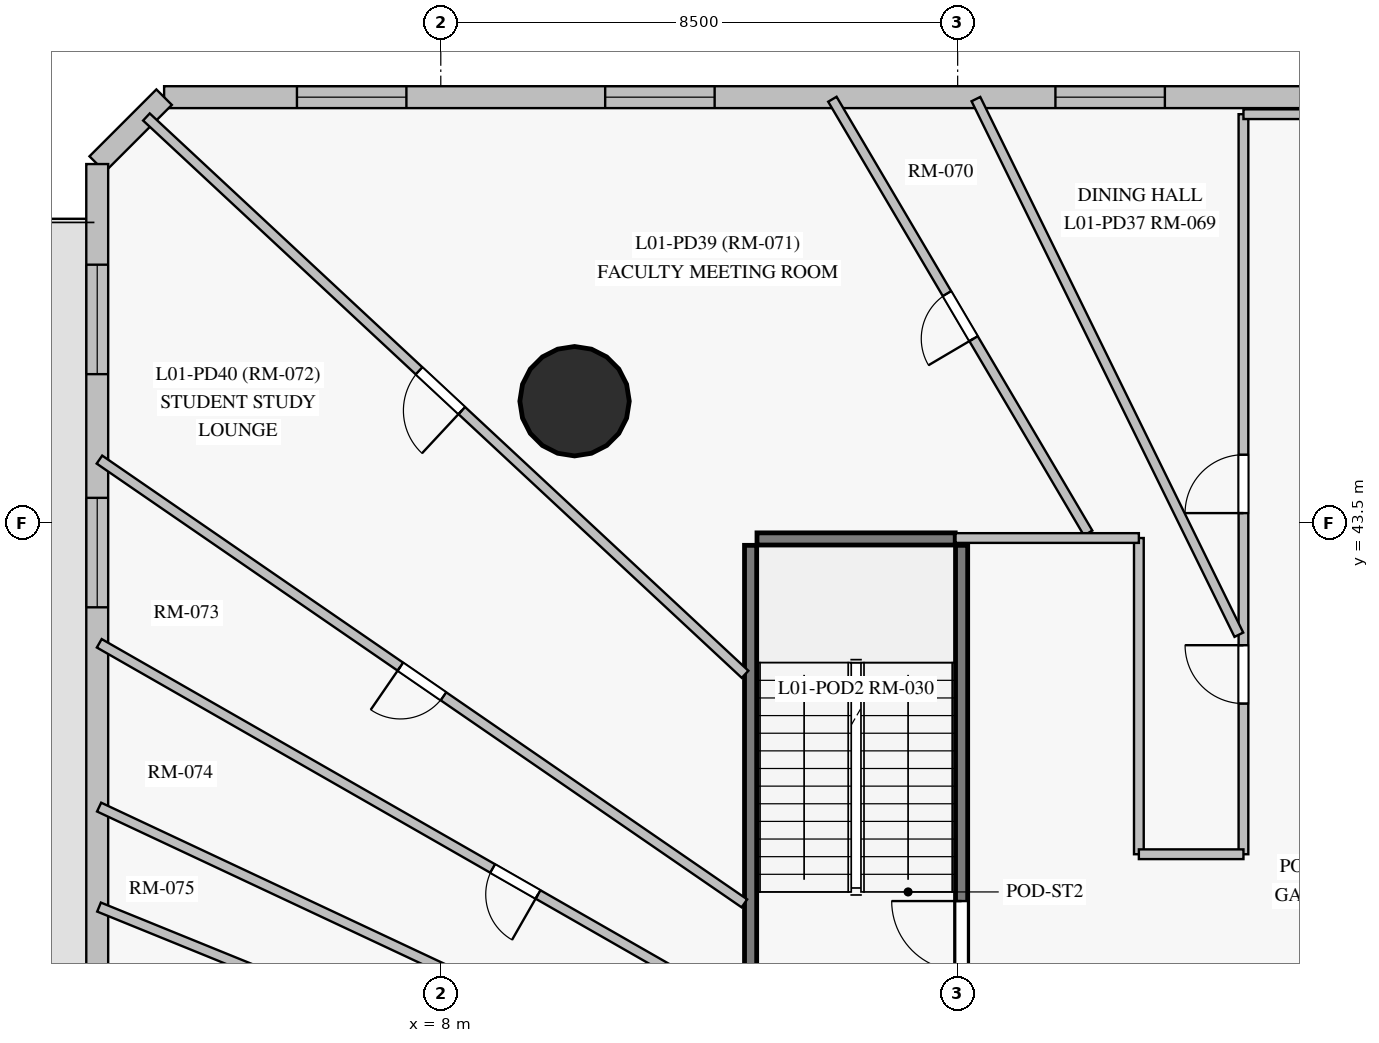
"""IFC4 building model, lengths in metres.
Left out: names, types, materials, properties, quantities, classifications, styles, units other than length and angle.
Written with IfcOpenShell. Run it as: python <this file> out.ifc"""

import sys

from ifc_helpers import new_model, si_unit, direction, frame, frame_2d, origin, origin_with_axes, origin_2d, place, context, subcontext, project, spatial, rectangle, circle, extrude, source, transform, mapped, element, fill, save


model = new_model("IFC4")
c1 = context("Model", 3, precision=1e-05, world=origin(), true_north=direction((0.0, 1.0)))
c2 = subcontext(c1, "Body", "Model", "MODEL_VIEW")
j1 = project(units=[si_unit("LENGTHUNIT", "METRE"), si_unit("PLANEANGLEUNIT", "RADIAN")], contexts=[c1])
p1 = place(None, origin())
s1 = spatial("IfcSite", under=j1, at=p1, CompositionType="ELEMENT")
p2 = place(p1, origin())
s2 = spatial("IfcBuilding", under=s1, at=p2, CompositionType="ELEMENT")
p3 = place(p2, frame((0.0, 0.0, 4.5)))
s3 = spatial("IfcBuildingStorey", under=s2, at=p3, CompositionType="ELEMENT", Elevation=4.5)
m1 = source(origin_with_axes(), c2, "Body", "SweptSolid", [
    extrude(circle(Radius=0.9, at=origin_2d()), origin(), (0.0, 0.0, 1.0), 4.5),
])
p4 = place(p3, frame((10.2, 45.5, 0.0), z_axis=(0.0, 0.0, 1.0), x_axis=(1.0, 0.0, 0.0)))
e1 = element("IfcColumn", 1, at=p4, inside=s3, PredefinedType="COLUMN", context=c2, shape_type="MappedRepresentation", body=[
    mapped(m1, transform((0.0, 0.0, 0.0), scale=1.0)),
])
p5 = place(p3, frame((55.3, 50.5, 0.0), z_axis=(0.0, 0.0, 1.0), x_axis=(-1.0, 0.0, 0.0)))
e2 = element("IfcWall", 2, at=p5, inside=s3, PredefinedType="SOLIDWALL", context=c2, shape_type="SweptSolid", body=[
    extrude(rectangle(XDim=51.85, YDim=0.36, at=frame_2d((25.925, 0.0))), origin(), (0.0, 0.0, 1.0), 4.2),
])
p6 = place(p5, frame((1.739, 0.0, 0.85)))
e3 = element("IfcOpeningElement", 3, at=p6, cuts=e2, PredefinedType="OPENING", context=c2, shape_type="SweptSolid", body=[
    extrude(rectangle(XDim=1.8, YDim=2.2, at=frame_2d((0.9, 1.1))), frame((0.0, 0.19, 0.0), z_axis=(0.0, -1.0, 0.0), x_axis=(1.0, 0.0, 0.0)), (0.0, 0.0, 1.0), 0.38),
])
p7 = place(p5, frame((7.064, 0.0, 0.85)))
e4 = element("IfcOpeningElement", 4, at=p7, cuts=e2, PredefinedType="OPENING", context=c2, shape_type="SweptSolid", body=[
    extrude(rectangle(XDim=1.8, YDim=2.2, at=frame_2d((0.9, 1.1))), frame((0.0, 0.19, 0.0), z_axis=(0.0, -1.0, 0.0), x_axis=(1.0, 0.0, 0.0)), (0.0, 0.0, 1.0), 0.38),
])
p8 = place(p5, frame((14.517, 0.0, 0.85)))
e5 = element("IfcOpeningElement", 5, at=p8, cuts=e2, PredefinedType="OPENING", context=c2, shape_type="SweptSolid", body=[
    extrude(rectangle(XDim=1.8, YDim=2.2, at=frame_2d((0.9, 1.1))), frame((0.0, 0.19, 0.0), z_axis=(0.0, -1.0, 0.0), x_axis=(1.0, 0.0, 0.0)), (0.0, 0.0, 1.0), 0.38),
])
p9 = place(p5, frame((19.389, 0.0, 0.85)))
e6 = element("IfcOpeningElement", 6, at=p9, cuts=e2, PredefinedType="OPENING", context=c2, shape_type="SweptSolid", body=[
    extrude(rectangle(XDim=1.8, YDim=2.2, at=frame_2d((0.9, 1.1))), frame((0.0, 0.19, 0.0), z_axis=(0.0, -1.0, 0.0), x_axis=(1.0, 0.0, 0.0)), (0.0, 0.0, 1.0), 0.38),
])
p10 = place(p5, frame((23.507, 0.0, 0.85)))
e7 = element("IfcOpeningElement", 7, at=p10, cuts=e2, PredefinedType="OPENING", context=c2, shape_type="SweptSolid", body=[
    extrude(rectangle(XDim=1.8, YDim=2.2, at=frame_2d((0.9, 1.1))), frame((0.0, 0.19, 0.0), z_axis=(0.0, -1.0, 0.0), x_axis=(1.0, 0.0, 0.0)), (0.0, 0.0, 1.0), 0.38),
])
p11 = place(p5, frame((27.282, 0.0, 0.85)))
e8 = element("IfcOpeningElement", 8, at=p11, cuts=e2, PredefinedType="OPENING", context=c2, shape_type="SweptSolid", body=[
    extrude(rectangle(XDim=1.8, YDim=2.2, at=frame_2d((0.9, 1.1))), frame((0.0, 0.19, 0.0), z_axis=(0.0, -1.0, 0.0), x_axis=(1.0, 0.0, 0.0)), (0.0, 0.0, 1.0), 0.38),
])
p12 = place(p5, frame((31.1, 0.0, 0.85)))
e9 = element("IfcOpeningElement", 9, at=p12, cuts=e2, PredefinedType="OPENING", context=c2, shape_type="SweptSolid", body=[
    extrude(rectangle(XDim=1.8, YDim=2.2, at=frame_2d((0.9, 1.1))), frame((0.0, 0.19, 0.0), z_axis=(0.0, -1.0, 0.0), x_axis=(1.0, 0.0, 0.0)), (0.0, 0.0, 1.0), 0.38),
])
p13 = place(p5, frame((35.392, 0.0, 0.85)))
e10 = element("IfcOpeningElement", 10, at=p13, cuts=e2, PredefinedType="OPENING", context=c2, shape_type="SweptSolid", body=[
    extrude(rectangle(XDim=1.8, YDim=2.2, at=frame_2d((0.9, 1.1))), frame((0.0, 0.19, 0.0), z_axis=(0.0, -1.0, 0.0), x_axis=(1.0, 0.0, 0.0)), (0.0, 0.0, 1.0), 0.38),
])
p14 = place(p5, frame((42.797, 0.0, 0.85)))
e11 = element("IfcOpeningElement", 11, at=p14, cuts=e2, PredefinedType="OPENING", context=c2, shape_type="SweptSolid", body=[
    extrude(rectangle(XDim=1.8, YDim=2.2, at=frame_2d((0.9, 1.1))), frame((0.0, 0.19, 0.0), z_axis=(0.0, -1.0, 0.0), x_axis=(1.0, 0.0, 0.0)), (0.0, 0.0, 1.0), 0.38),
])
p15 = place(p5, frame((47.865, 0.0, 0.85)))
e12 = element("IfcOpeningElement", 12, at=p15, cuts=e2, PredefinedType="OPENING", context=c2, shape_type="SweptSolid", body=[
    extrude(rectangle(XDim=1.8, YDim=2.2, at=frame_2d((0.9, 1.1))), frame((0.0, 0.19, 0.0), z_axis=(0.0, -1.0, 0.0), x_axis=(1.0, 0.0, 0.0)), (0.0, 0.0, 1.0), 0.38),
])
p16 = place(p3, frame((3.45, 50.5, 0.0), z_axis=(0.0, 0.0, 1.0), x_axis=(-0.707028305322, -0.707185248342, 0.0)))
e13 = element("IfcWall", 13, at=p16, inside=s3, PredefinedType="SOLIDWALL", context=c2, shape_type="SweptSolid", body=[
    extrude(rectangle(XDim=1.556, YDim=0.36, at=frame_2d((0.778, 0.0))), origin(), (0.0, 0.0, 1.0), 4.2),
])
p17 = place(p3, frame((2.35, 49.4, 0.0), z_axis=(0.0, 0.0, 1.0), x_axis=(0.0, -1.0, 0.0)))
e14 = element("IfcWall", 14, at=p17, inside=s3, PredefinedType="SOLIDWALL", context=c2, shape_type="SweptSolid", body=[
    extrude(rectangle(XDim=45.8, YDim=0.36, at=frame_2d((22.9, 0.0))), origin(), (0.0, 0.0, 1.0), 4.2),
])
p18 = place(p17, frame((1.655, 0.0, 0.85)))
e15 = element("IfcOpeningElement", 15, at=p18, cuts=e14, PredefinedType="OPENING", context=c2, shape_type="SweptSolid", body=[
    extrude(rectangle(XDim=1.8, YDim=2.2, at=frame_2d((0.9, 1.1))), frame((0.0, 0.19, 0.0), z_axis=(0.0, -1.0, 0.0), x_axis=(1.0, 0.0, 0.0)), (0.0, 0.0, 1.0), 0.38),
])
p19 = place(p17, frame((5.489, 0.0, 0.85)))
e16 = element("IfcOpeningElement", 16, at=p19, cuts=e14, PredefinedType="OPENING", context=c2, shape_type="SweptSolid", body=[
    extrude(rectangle(XDim=1.8, YDim=2.2, at=frame_2d((0.9, 1.1))), frame((0.0, 0.19, 0.0), z_axis=(0.0, -1.0, 0.0), x_axis=(1.0, 0.0, 0.0)), (0.0, 0.0, 1.0), 0.38),
])
p20 = place(p17, frame((19.82, 0.0, 0.85)))
e17 = element("IfcOpeningElement", 17, at=p20, cuts=e14, PredefinedType="OPENING", context=c2, shape_type="SweptSolid", body=[
    extrude(rectangle(XDim=1.8, YDim=2.2, at=frame_2d((0.9, 1.1))), frame((0.0, 0.19, 0.0), z_axis=(0.0, -1.0, 0.0), x_axis=(1.0, 0.0, 0.0)), (0.0, 0.0, 1.0), 0.38),
])
p21 = place(p17, frame((23.368, 0.0, 0.85)))
e18 = element("IfcOpeningElement", 18, at=p21, cuts=e14, PredefinedType="OPENING", context=c2, shape_type="SweptSolid", body=[
    extrude(rectangle(XDim=1.8, YDim=2.2, at=frame_2d((0.9, 1.1))), frame((0.0, 0.19, 0.0), z_axis=(0.0, -1.0, 0.0), x_axis=(1.0, 0.0, 0.0)), (0.0, 0.0, 1.0), 0.38),
])
p22 = place(p17, frame((27.016, 0.0, 0.85)))
e19 = element("IfcOpeningElement", 19, at=p22, cuts=e14, PredefinedType="OPENING", context=c2, shape_type="SweptSolid", body=[
    extrude(rectangle(XDim=1.8, YDim=2.2, at=frame_2d((0.9, 1.1))), frame((0.0, 0.19, 0.0), z_axis=(0.0, -1.0, 0.0), x_axis=(1.0, 0.0, 0.0)), (0.0, 0.0, 1.0), 0.38),
])
p23 = place(p17, frame((32.039, 0.0, 0.85)))
e20 = element("IfcOpeningElement", 20, at=p23, cuts=e14, PredefinedType="OPENING", context=c2, shape_type="SweptSolid", body=[
    extrude(rectangle(XDim=1.8, YDim=2.2, at=frame_2d((0.9, 1.1))), frame((0.0, 0.19, 0.0), z_axis=(0.0, -1.0, 0.0), x_axis=(1.0, 0.0, 0.0)), (0.0, 0.0, 1.0), 0.38),
])
p24 = place(p17, frame((37.994, 0.0, 0.85)))
e21 = element("IfcOpeningElement", 21, at=p24, cuts=e14, PredefinedType="OPENING", context=c2, shape_type="SweptSolid", body=[
    extrude(rectangle(XDim=1.8, YDim=2.2, at=frame_2d((0.9, 1.1))), frame((0.0, 0.19, 0.0), z_axis=(0.0, -1.0, 0.0), x_axis=(1.0, 0.0, 0.0)), (0.0, 0.0, 1.0), 0.38),
])
p25 = place(p17, frame((42.795, 0.0, 0.85)))
e22 = element("IfcOpeningElement", 22, at=p25, cuts=e14, PredefinedType="OPENING", context=c2, shape_type="SweptSolid", body=[
    extrude(rectangle(XDim=1.8, YDim=2.2, at=frame_2d((0.9, 1.1))), frame((0.0, 0.19, 0.0), z_axis=(0.0, -1.0, 0.0), x_axis=(1.0, 0.0, 0.0)), (0.0, 0.0, 1.0), 0.38),
])
p26 = place(p17, frame((14.742, 0.0, 0.0)))
e23 = element("IfcOpeningElement", 23, at=p26, cuts=e14, PredefinedType="OPENING", context=c2, shape_type="SweptSolid", body=[
    extrude(rectangle(XDim=1.05, YDim=2.12, at=frame_2d((0.525, 1.06))), frame((0.0, 0.19, 0.0), z_axis=(0.0, -1.0, 0.0), x_axis=(1.0, 0.0, 0.0)), (0.0, 0.0, 1.0), 0.38),
])
p27 = place(p3, frame((13.095, 35.78, 0.0), z_axis=(0.0, 0.0, 1.0), x_axis=(0.0, 1.0, 0.0)))
e24 = element("IfcWall", 24, at=p27, inside=s3, PredefinedType="SHEAR", context=c2, shape_type="SweptSolid", body=[
    extrude(rectangle(XDim=7.35, YDim=0.2, at=frame_2d((3.675, 0.0))), origin(), (0.0, 0.0, 1.0), 4.2),
])
p28 = place(p3, frame((16.565, 35.78, 0.0), z_axis=(0.0, 0.0, 1.0), x_axis=(0.0, 1.0, 0.0)))
e25 = element("IfcWall", 25, at=p28, inside=s3, PredefinedType="SHEAR", context=c2, shape_type="SweptSolid", body=[
    extrude(rectangle(XDim=7.35, YDim=0.2, at=frame_2d((3.675, 0.0))), origin(), (0.0, 0.0, 1.0), 4.2),
])
p29 = place(p28, frame((0.35, 0.0, 0.0)))
e26 = element("IfcOpeningElement", 26, at=p29, cuts=e25, PredefinedType="OPENING", context=c2, shape_type="SweptSolid", body=[
    extrude(rectangle(XDim=1.15, YDim=2.15, at=frame_2d((0.575, 1.075))), frame((0.0, 0.11, 0.0), z_axis=(0.0, -1.0, 0.0), x_axis=(1.0, 0.0, 0.0)), (0.0, 0.0, 1.0), 0.22),
])
p30 = place(p3, frame((13.2, 43.235, 0.0), z_axis=(0.0, 0.0, 1.0), x_axis=(1.0, 0.0, 0.0)))
e27 = element("IfcWall", 27, at=p30, inside=s3, PredefinedType="SHEAR", context=c2, shape_type="SweptSolid", body=[
    extrude(rectangle(XDim=3.26, YDim=0.2, at=frame_2d((1.63, 0.0))), origin(), (0.0, 0.0, 1.0), 4.2),
])
p31 = place(p3, frame((16.068, 33.686, 0.0), z_axis=(0.0, 0.0, 1.0), x_axis=(-0.867874159782, 0.496784100774, 0.0)))
e28 = element("IfcWall", 28, at=p31, inside=s3, PredefinedType="PARTITIONING", context=c2, shape_type="SweptSolid", body=[
    extrude(rectangle(XDim=15.768, YDim=0.16, at=frame_2d((7.884, 0.0))), origin(), (0.0, 0.0, 1.0), 4.2),
])
p32 = place(p31, frame((7.454, 0.0, 0.0)))
e29 = element("IfcOpeningElement", 29, at=p32, cuts=e28, PredefinedType="OPENING", context=c2, shape_type="SweptSolid", body=[
    extrude(rectangle(XDim=0.86, YDim=2.04, at=frame_2d((0.43, 1.02))), frame((0.0, 0.09, 0.0), z_axis=(0.0, -1.0, 0.0), x_axis=(1.0, 0.0, 0.0)), (0.0, 0.0, 1.0), 0.18),
])
p33 = place(p3, frame((16.068, 32.401, 0.0), z_axis=(0.0, 0.0, 1.0), x_axis=(-0.905248224799, 0.424883103334, 0.0)))
e30 = element("IfcWall", 30, at=p33, inside=s3, PredefinedType="PARTITIONING", context=c2, shape_type="SweptSolid", body=[
    extrude(rectangle(XDim=15.12, YDim=0.16, at=frame_2d((7.56, 0.0))), origin(), (0.0, 0.0, 1.0), 4.2),
])
p34 = place(p3, frame((16.068, 31.618, 0.0), z_axis=(0.0, 0.0, 1.0), x_axis=(-0.926404446812, 0.37652994692, 0.0)))
e31 = element("IfcWall", 31, at=p34, inside=s3, PredefinedType="PARTITIONING", context=c2, shape_type="SweptSolid", body=[
    extrude(rectangle(XDim=14.776, YDim=0.16, at=frame_2d((7.388, 0.0))), origin(), (0.0, 0.0, 1.0), 4.2),
])
p35 = place(p34, frame((6.958, 0.0, 0.0)))
e32 = element("IfcOpeningElement", 32, at=p35, cuts=e31, PredefinedType="OPENING", context=c2, shape_type="SweptSolid", body=[
    extrude(rectangle(XDim=0.86, YDim=2.04, at=frame_2d((0.43, 1.02))), frame((0.0, 0.09, 0.0), z_axis=(0.0, -1.0, 0.0), x_axis=(1.0, 0.0, 0.0)), (0.0, 0.0, 1.0), 0.18),
])
p36 = place(p3, frame((13.004, 41.009, 0.0), z_axis=(0.0, 0.0, 1.0), x_axis=(-0.731912390856, 0.681398746779, 0.0)))
e33 = element("IfcWall", 33, at=p36, inside=s3, PredefinedType="PARTITIONING", context=c2, shape_type="SweptSolid", body=[
    extrude(rectangle(XDim=13.451, YDim=0.16, at=frame_2d((6.725, 0.0))), origin(), (0.0, 0.0, 1.0), 4.2),
])
p37 = place(p36, frame((6.365, 0.0, 0.0)))
e34 = element("IfcOpeningElement", 34, at=p37, cuts=e33, PredefinedType="OPENING", context=c2, shape_type="SweptSolid", body=[
    extrude(rectangle(XDim=0.96, YDim=2.15, at=frame_2d((0.48, 1.075))), frame((0.0, 0.09, 0.0), z_axis=(0.0, -1.0, 0.0), x_axis=(1.0, 0.0, 0.0)), (0.0, 0.0, 1.0), 0.18),
])
p38 = place(p3, frame((12.993, 37.242, 0.0), z_axis=(0.0, 0.0, 1.0), x_axis=(-0.823836041433, 0.566828172232, 0.0)))
e35 = element("IfcWall", 35, at=p38, inside=s3, PredefinedType="PARTITIONING", context=c2, shape_type="SweptSolid", body=[
    extrude(rectangle(XDim=12.875, YDim=0.16, at=frame_2d((6.437, 0.0))), origin(), (0.0, 0.0, 1.0), 4.2),
])
p39 = place(p38, frame((6.007, 0.0, 0.0)))
e36 = element("IfcOpeningElement", 36, at=p39, cuts=e35, PredefinedType="OPENING", context=c2, shape_type="SweptSolid", body=[
    extrude(rectangle(XDim=0.86, YDim=2.04, at=frame_2d((0.43, 1.02))), frame((0.0, 0.09, 0.0), z_axis=(0.0, -1.0, 0.0), x_axis=(1.0, 0.0, 0.0)), (0.0, 0.0, 1.0), 0.18),
])
p40 = place(p3, frame((21.2, 38.05, 0.0), z_axis=(0.0, 0.0, 1.0), x_axis=(0.0, 1.0, 0.0)))
e37 = element("IfcWall", 37, at=p40, inside=s3, PredefinedType="PARTITIONING", context=c2, shape_type="SweptSolid", body=[
    extrude(rectangle(XDim=12.17, YDim=0.16, at=frame_2d((6.085, 0.0))), origin(), (0.0, 0.0, 1.0), 4.2),
])
p41 = place(p40, frame((5.61, 0.0, 0.0)))
e38 = element("IfcOpeningElement", 38, at=p41, cuts=e37, PredefinedType="OPENING", context=c2, shape_type="SweptSolid", body=[
    extrude(rectangle(XDim=0.96, YDim=2.15, at=frame_2d((0.48, 1.075))), frame((0.0, 0.09, 0.0), z_axis=(0.0, -1.0, 0.0), x_axis=(1.0, 0.0, 0.0)), (0.0, 0.0, 1.0), 0.18),
])
p42 = place(p40, frame((2.478, 0.0, 0.0)))
e39 = element("IfcOpeningElement", 39, at=p42, cuts=e37, PredefinedType="OPENING", context=c2, shape_type="SweptSolid", body=[
    extrude(rectangle(XDim=0.96, YDim=2.15, at=frame_2d((0.48, 1.075))), frame((0.0, 0.09, 0.0), z_axis=(0.0, -1.0, 0.0), x_axis=(1.0, 0.0, 0.0)), (0.0, 0.0, 1.0), 0.18),
])
p43 = place(p3, frame((21.125, 41.66, 0.0), z_axis=(0.0, 0.0, 1.0), x_axis=(-0.440663348881, 0.897672441903, 0.0)))
e40 = element("IfcWall", 40, at=p43, inside=s3, PredefinedType="PARTITIONING", context=c2, shape_type="SweptSolid", body=[
    extrude(rectangle(XDim=9.813, YDim=0.16, at=frame_2d((4.906, 0.0))), origin(), (0.0, 0.0, 1.0), 4.2),
])
p44 = place(p3, frame((18.646, 43.332, 0.0), z_axis=(0.0, 0.0, 1.0), x_axis=(-0.50787789651, 0.861429069765, 0.0)))
e41 = element("IfcWall", 41, at=p44, inside=s3, PredefinedType="PARTITIONING", context=c2, shape_type="SweptSolid", body=[
    extrude(rectangle(XDim=8.282, YDim=0.16, at=frame_2d((4.141, 0.0))), origin(), (0.0, 0.0, 1.0), 4.2),
])
p45 = place(p44, frame((3.711, 0.0, 0.0)))
e42 = element("IfcOpeningElement", 42, at=p45, cuts=e41, PredefinedType="OPENING", context=c2, shape_type="SweptSolid", body=[
    extrude(rectangle(XDim=0.86, YDim=2.04, at=frame_2d((0.43, 1.02))), frame((0.0, 0.09, 0.0), z_axis=(0.0, -1.0, 0.0), x_axis=(1.0, 0.0, 0.0)), (0.0, 0.0, 1.0), 0.18),
])
p46 = place(p3, frame((19.48, 43.25, 0.0), z_axis=(0.0, 0.0, 1.0), x_axis=(0.0, -1.0, 0.0)))
e43 = element("IfcWall", 43, at=p46, inside=s3, PredefinedType="PARTITIONING", context=c2, shape_type="SweptSolid", body=[
    extrude(rectangle(XDim=5.2, YDim=0.16, at=frame_2d((2.6, 0.0))), origin(), (0.0, 0.0, 1.0), 4.2),
])
p47 = place(p3, frame((21.2, 50.22, 0.0), z_axis=(0.0, 0.0, 1.0), x_axis=(1.0, 0.0, 0.0)))
e44 = element("IfcWall", 44, at=p47, inside=s3, PredefinedType="PARTITIONING", context=c2, shape_type="SweptSolid", body=[
    extrude(rectangle(XDim=4.2, YDim=0.16, at=frame_2d((2.1, 0.0))), origin(), (0.0, 0.0, 1.0), 4.2),
])
p48 = place(p3, frame((16.465, 43.25, 0.0), z_axis=(0.0, 0.0, 1.0), x_axis=(1.0, 0.0, 0.0)))
e45 = element("IfcWall", 45, at=p48, inside=s3, PredefinedType="PARTITIONING", context=c2, shape_type="SweptSolid", body=[
    extrude(rectangle(XDim=3.015, YDim=0.16, at=frame_2d((1.507, 0.0))), origin(), (0.0, 0.0, 1.0), 4.2),
])
p49 = place(p3, frame((19.48, 38.05, 0.0), z_axis=(0.0, 0.0, 1.0), x_axis=(1.0, 0.0, 0.0)))
e46 = element("IfcWall", 46, at=p49, inside=s3, PredefinedType="PARTITIONING", context=c2, shape_type="SweptSolid", body=[
    extrude(rectangle(XDim=1.72, YDim=0.16, at=frame_2d((0.86, 0.0))), origin(), (0.0, 0.0, 1.0), 4.2),
])
m2 = source(origin_with_axes(), c2, "Body", "SweptSolid", [
    extrude(rectangle(XDim=1.8, YDim=2.2, at=frame_2d((0.9, 1.1))), frame((0.0, 0.03, 0.0), z_axis=(0.0, -1.0, 0.0), x_axis=(1.0, 0.0, 0.0)), (0.0, 0.0, 1.0), 0.06),
])
p50 = place(p13, origin())
e47 = element("IfcWindow", 47, at=p50, inside=s3, PartitioningType="SINGLE_PANEL", PredefinedType="WINDOW", context=c2, shape_type="MappedRepresentation", body=[
    mapped(m2, transform((0.0, 0.0, 0.0), scale=1.0)),
])
fill(e10, e47)
p51 = place(p14, origin())
e48 = element("IfcWindow", 48, at=p51, inside=s3, PartitioningType="SINGLE_PANEL", PredefinedType="WINDOW", context=c2, shape_type="MappedRepresentation", body=[
    mapped(m2, transform((0.0, 0.0, 0.0), scale=1.0)),
])
fill(e11, e48)
p52 = place(p15, origin())
e49 = element("IfcWindow", 49, at=p52, inside=s3, PartitioningType="SINGLE_PANEL", PredefinedType="WINDOW", context=c2, shape_type="MappedRepresentation", body=[
    mapped(m2, transform((0.0, 0.0, 0.0), scale=1.0)),
])
fill(e12, e49)
p53 = place(p18, origin())
e50 = element("IfcWindow", 50, at=p53, inside=s3, PartitioningType="SINGLE_PANEL", PredefinedType="WINDOW", context=c2, shape_type="MappedRepresentation", body=[
    mapped(m2, transform((0.0, 0.0, 0.0), scale=1.0)),
])
fill(e15, e50)
p54 = place(p19, origin())
e51 = element("IfcWindow", 51, at=p54, inside=s3, PartitioningType="SINGLE_PANEL", PredefinedType="WINDOW", context=c2, shape_type="MappedRepresentation", body=[
    mapped(m2, transform((0.0, 0.0, 0.0), scale=1.0)),
])
fill(e16, e51)
m3 = source(origin_with_axes(), c2, "Body", "SweptSolid", [
    extrude(rectangle(XDim=1.15, YDim=2.15, at=frame_2d((0.575, 1.075))), frame((0.0, 0.025, 0.0), z_axis=(0.0, -1.0, 0.0), x_axis=(1.0, 0.0, 0.0)), (0.0, 0.0, 1.0), 0.05),
])
p55 = place(p29, origin())
e52 = element("IfcDoor", 52, at=p55, inside=s3, OperationType="SINGLE_SWING_RIGHT", PredefinedType="DOOR", context=c2, shape_type="MappedRepresentation", body=[
    mapped(m3, transform((0.0, 0.0, 0.0), scale=1.0)),
])
fill(e26, e52)
m4 = source(origin_with_axes(), c2, "Body", "SweptSolid", [
    extrude(rectangle(XDim=0.96, YDim=2.15, at=frame_2d((0.48, 1.075))), frame((0.0, 0.025, 0.0), z_axis=(0.0, -1.0, 0.0), x_axis=(1.0, 0.0, 0.0)), (0.0, 0.0, 1.0), 0.05),
])
p56 = place(p41, origin())
e53 = element("IfcDoor", 53, at=p56, inside=s3, OperationType="SINGLE_SWING_LEFT", PredefinedType="DOOR", context=c2, shape_type="MappedRepresentation", body=[
    mapped(m4, transform((0.0, 0.0, 0.0), scale=1.0)),
])
fill(e38, e53)
p57 = place(p42, origin())
e54 = element("IfcDoor", 54, at=p57, inside=s3, OperationType="SINGLE_SWING_RIGHT", PredefinedType="DOOR", context=c2, shape_type="MappedRepresentation", body=[
    mapped(m4, transform((0.0, 0.0, 0.0), scale=1.0)),
])
fill(e39, e54)
p58 = place(p37, origin())
e55 = element("IfcDoor", 55, at=p58, inside=s3, OperationType="SINGLE_SWING_LEFT", PredefinedType="DOOR", context=c2, shape_type="MappedRepresentation", body=[
    mapped(m4, transform((0.0, 0.0, 0.0), scale=1.0)),
])
fill(e34, e55)
m5 = source(origin_with_axes(), c2, "Body", "SweptSolid", [
    extrude(rectangle(XDim=0.86, YDim=2.04, at=frame_2d((0.43, 1.02))), frame((0.0, 0.025, 0.0), z_axis=(0.0, -1.0, 0.0), x_axis=(1.0, 0.0, 0.0)), (0.0, 0.0, 1.0), 0.05),
])
p59 = place(p45, origin())
e56 = element("IfcDoor", 56, at=p59, inside=s3, OperationType="SINGLE_SWING_LEFT", PredefinedType="DOOR", context=c2, shape_type="MappedRepresentation", body=[
    mapped(m5, transform((0.0, 0.0, 0.0), scale=1.0)),
])
fill(e42, e56)
p60 = place(p39, origin())
e57 = element("IfcDoor", 57, at=p60, inside=s3, OperationType="SINGLE_SWING_RIGHT", PredefinedType="DOOR", context=c2, shape_type="MappedRepresentation", body=[
    mapped(m5, transform((0.0, 0.0, 0.0), scale=1.0)),
])
fill(e36, e57)
p61 = place(p32, origin())
e58 = element("IfcDoor", 58, at=p61, inside=s3, OperationType="SINGLE_SWING_LEFT", PredefinedType="DOOR", context=c2, shape_type="MappedRepresentation", body=[
    mapped(m5, transform((0.0, 0.0, 0.0), scale=1.0)),
])
fill(e29, e58)
save(model, sys.argv[1])
